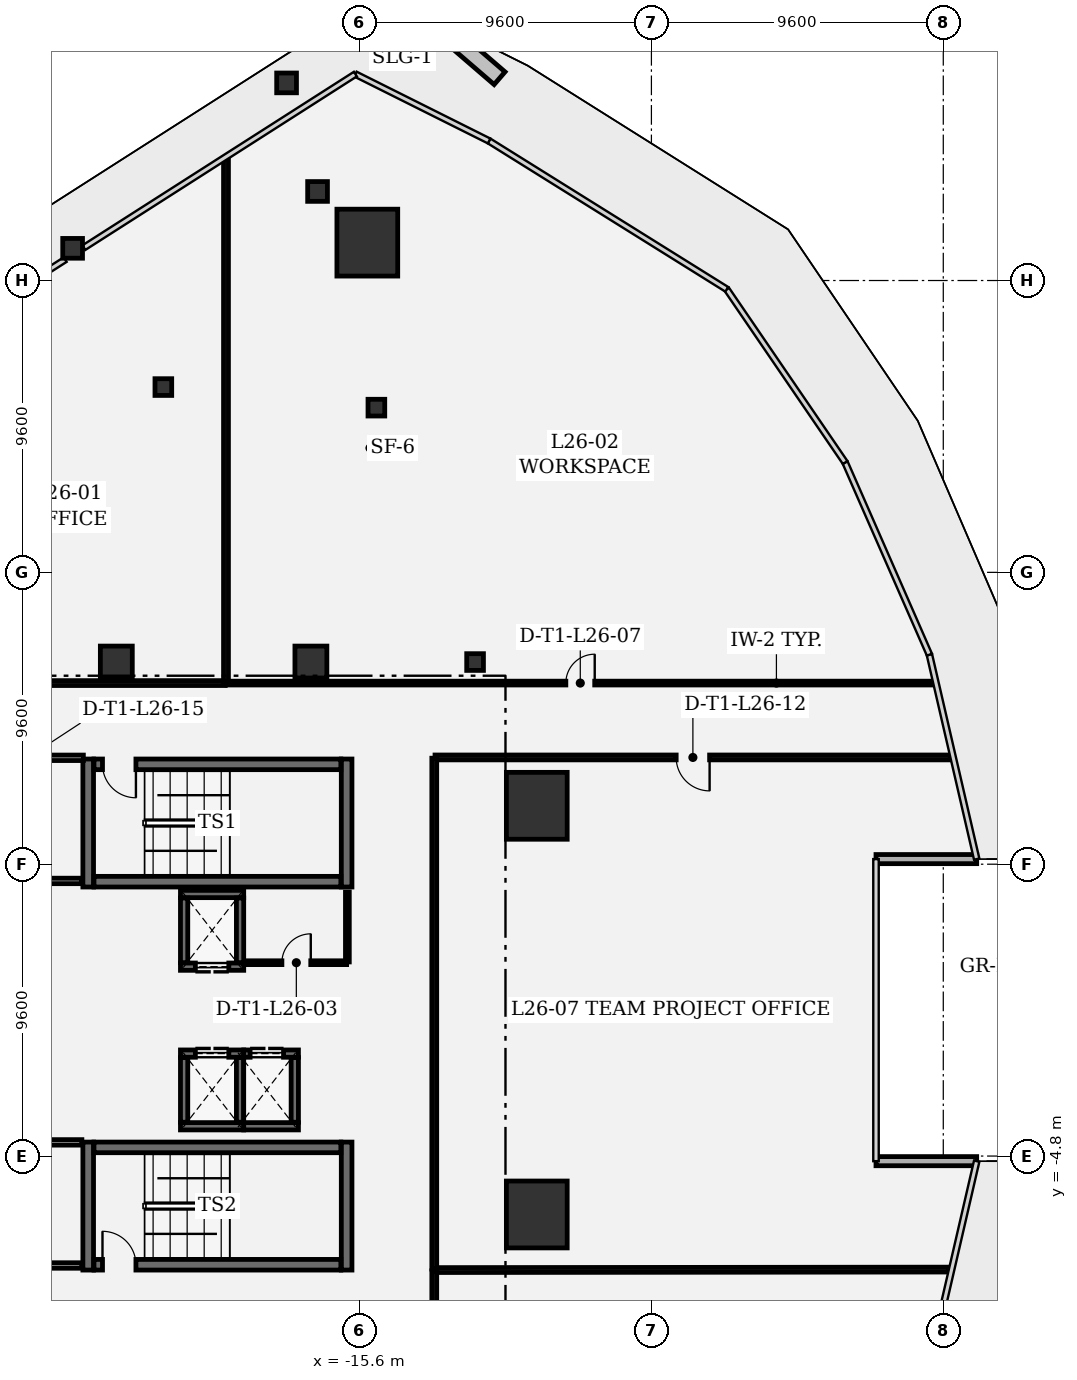
"""IFC4 building model, lengths in metres.
Left out: names, types, materials, properties, quantities, classifications, styles, units other than length and angle.
Written with IfcOpenShell. Run it as: python <this file> out.ifc"""

import sys

from ifc_helpers import new_model, si_unit, direction, frame, frame_2d, origin, origin_2d, place, context, subcontext, project, spatial, rectangle, extrude, element, fill, save


model = new_model("IFC4")
c1 = context("Model", 3, precision=1e-05, world=origin(), true_north=direction((0.0, 1.0)))
c2 = subcontext(c1, "Body", "Model", "MODEL_VIEW")
j1 = project(units=[si_unit("LENGTHUNIT", "METRE"), si_unit("PLANEANGLEUNIT", "RADIAN")], contexts=[c1])
p1 = place(None, origin())
s1 = spatial("IfcSite", under=j1, at=p1, CompositionType="ELEMENT")
p2 = place(p1, origin())
s2 = spatial("IfcBuilding", under=s1, at=p2, CompositionType="ELEMENT")
p3 = place(p2, frame((0.0, 0.0, 117.9)))
s3 = spatial("IfcBuildingStorey", under=s2, at=p3, CompositionType="ELEMENT", Elevation=117.9)
for number, where, z_axis, x_axis in (
    (1, (-9.77, -6.721, 0.0), (0.0, 0.0, 1.0), (1.0, 0.0, 0.0)),
    (2, (-9.77, 6.721, 0.0), (0.0, 0.0, 1.0), (1.0, 0.0, 0.0)),
    (3, (-15.344, 25.246, 0.0), (0.0, 0.0, 1.0), (1.0, 0.0, 0.0)),
):
    element("IfcColumn", number, at=place(p3, frame(where, z_axis=z_axis, x_axis=x_axis)), inside=s3, PredefinedType="COLUMN", context=c2, shape_type="SweptSolid", body=[
        extrude(rectangle(XDim=2.0, YDim=2.2, at=origin_2d()), origin(), (0.0, 0.0, 1.0), 4.05),
    ])
for number, where, z_axis, x_axis in (
    (4, (-23.6, 11.45, 0.0), (0.0, 0.0, 1.0), (1.0, 0.0, 0.0)),
    (5, (-17.2, 11.45, 0.0), (0.0, 0.0, 1.0), (1.0, 0.0, 0.0)),
):
    element("IfcColumn", number, at=place(p3, frame(where, z_axis=z_axis, x_axis=x_axis)), inside=s3, PredefinedType="COLUMN", context=c2, shape_type="SweptSolid", body=[
        extrude(rectangle(XDim=1.05, YDim=1.05, at=origin_2d()), origin(), (0.0, 0.0, 1.0), 4.05),
    ])
for number, where, z_axis, x_axis in (
    (6, (-18.0, 30.5, 0.0), (0.0, 0.0, 1.0), (1.0, 0.0, 0.0)),
    (7, (-25.038, 25.059, 0.0), (0.0, 0.0, 1.0), (1.0, 0.0, 0.0)),
    (8, (-16.981, 26.929, 0.0), (0.0, 0.0, 1.0), (1.0, 0.0, 0.0)),
):
    element("IfcColumn", number, at=place(p3, frame(where, z_axis=z_axis, x_axis=x_axis)), inside=s3, PredefinedType="COLUMN", context=c2, shape_type="SweptSolid", body=[
        extrude(rectangle(XDim=0.65, YDim=0.65, at=origin_2d()), origin(), (0.0, 0.0, 1.0), 4.05),
    ])
for number, where, z_axis, x_axis in (
    (9, (-22.053, 20.495, 0.0), (0.0, 0.0, 1.0), (1.0, 0.0, 0.0)),
    (10, (-15.046, 19.818, 0.0), (0.0, 0.0, 1.0), (1.0, 0.0, 0.0)),
    (11, (-11.8, 11.45, 0.0), (0.0, 0.0, 1.0), (1.0, 0.0, 0.0)),
):
    element("IfcColumn", number, at=place(p3, frame(where, z_axis=z_axis, x_axis=x_axis)), inside=s3, PredefinedType="COLUMN", context=c2, shape_type="SweptSolid", body=[
        extrude(rectangle(XDim=0.55, YDim=0.55, at=origin_2d()), origin(), (0.0, 0.0, 1.0), 4.05),
    ])
for number, where, z_axis, x_axis in (
    (12, (4.699, -4.968, 0.0), (0.0, 0.0, 1.0), (-1.0, 0.0, 0.0)),
    (13, (1.387, 4.968, 0.0), (0.0, 0.0, 1.0), (1.0, 0.0, 0.0)),
):
    element("IfcWall", number, at=place(p3, frame(where, z_axis=z_axis, x_axis=x_axis)), inside=s3, PredefinedType="SOLIDWALL", context=c2, shape_type="SweptSolid", body=[
        extrude(rectangle(XDim=3.312, YDim=0.3, at=frame_2d((1.656, 0.0))), origin(), (0.0, 0.0, 1.0), 3.77),
    ])
for number, where, z_axis, x_axis in (
    (14, (-24.525, 8.26, 0.0), (0.0, 0.0, 1.0), (0.0, -1.0, 0.0)),
    (15, (-16.025, 4.05, 0.0), (0.0, 0.0, 1.0), (0.0, 1.0, 0.0)),
):
    element("IfcWall", number, at=place(p3, frame(where, z_axis=z_axis, x_axis=x_axis)), inside=s3, PredefinedType="SHEAR", context=c2, shape_type="SweptSolid", body=[
        extrude(rectangle(XDim=4.21, YDim=0.35, at=frame_2d((2.105, 0.0))), origin(), (0.0, 0.0, 1.0), 3.77),
    ])
p4 = place(p3, frame((-24.335, 4.225, 0.0), z_axis=(0.0, 0.0, 1.0), x_axis=(1.0, 0.0, 0.0)))
e16 = element("IfcWall", 16, at=p4, inside=s3, PredefinedType="SHEAR", context=c2, shape_type="SweptSolid", body=[
    extrude(rectangle(XDim=8.12, YDim=0.35, at=frame_2d((4.06, 0.0))), origin(), (0.0, 0.0, 1.0), 3.77),
])
p5 = place(p3, frame((-16.215, 8.085, 0.0), z_axis=(0.0, 0.0, 1.0), x_axis=(-1.0, 0.0, 0.0)))
e17 = element("IfcWall", 17, at=p5, inside=s3, PredefinedType="SHEAR", context=c2, shape_type="SweptSolid", body=[
    extrude(rectangle(XDim=8.12, YDim=0.35, at=frame_2d((4.06, 0.0))), origin(), (0.0, 0.0, 1.0), 3.77),
])
p6 = place(p5, frame((6.74, 0.0, 0.0)))
e18 = element("IfcOpeningElement", 18, at=p6, cuts=e17, PredefinedType="OPENING", context=c2, shape_type="SweptSolid", body=[
    extrude(rectangle(XDim=1.1, YDim=2.2, at=frame_2d((0.55, 1.1))), frame((0.0, 0.185, 0.0), z_axis=(0.0, -1.0, 0.0), x_axis=(1.0, 0.0, 0.0)), (0.0, 0.0, 1.0), 0.37),
])
for number, where, z_axis, x_axis in (
    (19, (-24.525, -4.34, 0.0), (0.0, 0.0, 1.0), (0.0, -1.0, 0.0)),
    (20, (-16.025, -8.55, 0.0), (0.0, 0.0, 1.0), (0.0, 1.0, 0.0)),
):
    element("IfcWall", number, at=place(p3, frame(where, z_axis=z_axis, x_axis=x_axis)), inside=s3, PredefinedType="SHEAR", context=c2, shape_type="SweptSolid", body=[
        extrude(rectangle(XDim=4.21, YDim=0.35, at=frame_2d((2.105, 0.0))), origin(), (0.0, 0.0, 1.0), 3.77),
    ])
p7 = place(p3, frame((-24.335, -8.375, 0.0), z_axis=(0.0, 0.0, 1.0), x_axis=(1.0, 0.0, 0.0)))
e21 = element("IfcWall", 21, at=p7, inside=s3, PredefinedType="SHEAR", context=c2, shape_type="SweptSolid", body=[
    extrude(rectangle(XDim=8.12, YDim=0.35, at=frame_2d((4.06, 0.0))), origin(), (0.0, 0.0, 1.0), 3.77),
])
p8 = place(p7, frame((0.28, 0.0, 0.0)))
e22 = element("IfcOpeningElement", 22, at=p8, cuts=e21, PredefinedType="OPENING", context=c2, shape_type="SweptSolid", body=[
    extrude(rectangle(XDim=1.1, YDim=2.2, at=frame_2d((0.55, 1.1))), frame((0.0, 0.185, 0.0), z_axis=(0.0, -1.0, 0.0), x_axis=(1.0, 0.0, 0.0)), (0.0, 0.0, 1.0), 0.37),
])
p9 = place(p3, frame((-16.215, -4.515, 0.0), z_axis=(0.0, 0.0, 1.0), x_axis=(-1.0, 0.0, 0.0)))
e23 = element("IfcWall", 23, at=p9, inside=s3, PredefinedType="SHEAR", context=c2, shape_type="SweptSolid", body=[
    extrude(rectangle(XDim=8.12, YDim=0.35, at=frame_2d((4.06, 0.0))), origin(), (0.0, 0.0, 1.0), 3.77),
])
p10 = place(p3, frame((-19.41, 1.43, 0.0), z_axis=(0.0, 0.0, 1.0), x_axis=(-1.0, 0.0, 0.0)))
e24 = element("IfcWall", 24, at=p10, inside=s3, PredefinedType="SHEAR", context=c2, shape_type="SweptSolid", body=[
    extrude(rectangle(XDim=2.08, YDim=0.24, at=frame_2d((1.04, 0.0))), origin(), (0.0, 0.0, 1.0), 3.77),
])
p11 = place(p10, frame((0.49, 0.0, 0.0)))
e25 = element("IfcOpeningElement", 25, at=p11, cuts=e24, PredefinedType="OPENING", context=c2, shape_type="SweptSolid", body=[
    extrude(rectangle(XDim=1.1, YDim=2.2, at=frame_2d((0.55, 1.1))), frame((0.0, 0.13, 0.0), z_axis=(0.0, -1.0, 0.0), x_axis=(1.0, 0.0, 0.0)), (0.0, 0.0, 1.0), 0.26),
])
p12 = place(p3, frame((-21.49, 3.82, 0.0), z_axis=(0.0, 0.0, 1.0), x_axis=(1.0, 0.0, 0.0)))
e26 = element("IfcWall", 26, at=p12, inside=s3, PredefinedType="SHEAR", context=c2, shape_type="SweptSolid", body=[
    extrude(rectangle(XDim=2.08, YDim=0.24, at=frame_2d((1.04, 0.0))), origin(), (0.0, 0.0, 1.0), 3.77),
])
for number, where, z_axis, x_axis in (
    (27, (-21.37, 1.562, 0.0), (0.0, 0.0, 1.0), (0.0, 1.0, 0.0)),
    (28, (-19.53, 3.688, 0.0), (0.0, 0.0, 1.0), (0.0, -1.0, 0.0)),
):
    element("IfcWall", number, at=place(p3, frame(where, z_axis=z_axis, x_axis=x_axis)), inside=s3, PredefinedType="SHEAR", context=c2, shape_type="SweptSolid", body=[
        extrude(rectangle(XDim=2.126, YDim=0.24, at=frame_2d((1.063, 0.0))), origin(), (0.0, 0.0, 1.0), 3.77),
    ])
p13 = place(p3, frame((-19.41, -3.82, 0.0), z_axis=(0.0, 0.0, 1.0), x_axis=(-1.0, 0.0, 0.0)))
e29 = element("IfcWall", 29, at=p13, inside=s3, PredefinedType="SHEAR", context=c2, shape_type="SweptSolid", body=[
    extrude(rectangle(XDim=2.08, YDim=0.24, at=frame_2d((1.04, 0.0))), origin(), (0.0, 0.0, 1.0), 3.77),
])
p14 = place(p3, frame((-21.49, -1.43, 0.0), z_axis=(0.0, 0.0, 1.0), x_axis=(1.0, 0.0, 0.0)))
e30 = element("IfcWall", 30, at=p14, inside=s3, PredefinedType="SHEAR", context=c2, shape_type="SweptSolid", body=[
    extrude(rectangle(XDim=2.08, YDim=0.24, at=frame_2d((1.04, 0.0))), origin(), (0.0, 0.0, 1.0), 3.77),
])
p15 = place(p14, frame((0.49, 0.0, 0.0)))
e31 = element("IfcOpeningElement", 31, at=p15, cuts=e30, PredefinedType="OPENING", context=c2, shape_type="SweptSolid", body=[
    extrude(rectangle(XDim=1.1, YDim=2.2, at=frame_2d((0.55, 1.1))), frame((0.0, 0.13, 0.0), z_axis=(0.0, -1.0, 0.0), x_axis=(1.0, 0.0, 0.0)), (0.0, 0.0, 1.0), 0.26),
])
for number, where, z_axis, x_axis in (
    (32, (-21.37, -3.688, 0.0), (0.0, 0.0, 1.0), (0.0, 1.0, 0.0)),
    (33, (-19.53, -1.562, 0.0), (0.0, 0.0, 1.0), (0.0, -1.0, 0.0)),
):
    element("IfcWall", number, at=place(p3, frame(where, z_axis=z_axis, x_axis=x_axis)), inside=s3, PredefinedType="SHEAR", context=c2, shape_type="SweptSolid", body=[
        extrude(rectangle(XDim=2.126, YDim=0.24, at=frame_2d((1.063, 0.0))), origin(), (0.0, 0.0, 1.0), 3.77),
    ])
p16 = place(p3, frame((-17.61, -3.82, 0.0), z_axis=(0.0, 0.0, 1.0), x_axis=(-1.0, 0.0, 0.0)))
e34 = element("IfcWall", 34, at=p16, inside=s3, PredefinedType="SHEAR", context=c2, shape_type="SweptSolid", body=[
    extrude(rectangle(XDim=1.8, YDim=0.24, at=frame_2d((0.9, 0.0))), origin(), (0.0, 0.0, 1.0), 3.77),
])
p17 = place(p3, frame((-19.41, -1.43, 0.0), z_axis=(0.0, 0.0, 1.0), x_axis=(1.0, 0.0, 0.0)))
e35 = element("IfcWall", 35, at=p17, inside=s3, PredefinedType="SHEAR", context=c2, shape_type="SweptSolid", body=[
    extrude(rectangle(XDim=1.8, YDim=0.24, at=frame_2d((0.9, 0.0))), origin(), (0.0, 0.0, 1.0), 3.77),
])
p18 = place(p17, frame((0.21, 0.0, 0.0)))
e36 = element("IfcOpeningElement", 36, at=p18, cuts=e35, PredefinedType="OPENING", context=c2, shape_type="SweptSolid", body=[
    extrude(rectangle(XDim=1.1, YDim=2.2, at=frame_2d((0.55, 1.1))), frame((0.0, 0.13, 0.0), z_axis=(0.0, -1.0, 0.0), x_axis=(1.0, 0.0, 0.0)), (0.0, 0.0, 1.0), 0.26),
])
p19 = place(p3, frame((-17.73, -1.562, 0.0), z_axis=(0.0, 0.0, 1.0), x_axis=(0.0, -1.0, 0.0)))
e37 = element("IfcWall", 37, at=p19, inside=s3, PredefinedType="SHEAR", context=c2, shape_type="SweptSolid", body=[
    extrude(rectangle(XDim=2.126, YDim=0.24, at=frame_2d((1.063, 0.0))), origin(), (0.0, 0.0, 1.0), 3.77),
])
p20 = place(p3, frame((-28.355, 4.25, 0.0), z_axis=(0.0, 0.0, 1.0), x_axis=(1.0, 0.0, 0.0)))
e38 = element("IfcWall", 38, at=p20, inside=s3, PredefinedType="PARTITIONING", context=c2, shape_type="SweptSolid", body=[
    extrude(rectangle(XDim=3.622, YDim=0.18, at=frame_2d((1.811, 0.0))), origin(), (0.0, 0.0, 1.0), 3.77),
])
p21 = place(p3, frame((-24.684, 8.3, 0.0), z_axis=(0.0, 0.0, 1.0), x_axis=(-1.0, 0.0, 0.0)))
e39 = element("IfcWall", 39, at=p21, inside=s3, PredefinedType="PARTITIONING", context=c2, shape_type="SweptSolid", body=[
    extrude(rectangle(XDim=3.671, YDim=0.18, at=frame_2d((1.835, 0.0))), origin(), (0.0, 0.0, 1.0), 3.77),
])
p22 = place(p21, frame((1.335, 0.0, 0.0)))
e40 = element("IfcOpeningElement", 40, at=p22, cuts=e39, PredefinedType="OPENING", context=c2, shape_type="SweptSolid", body=[
    extrude(rectangle(XDim=1.0, YDim=2.15, at=frame_2d((0.5, 1.075))), frame((0.0, 0.1, 0.0), z_axis=(0.0, -1.0, 0.0), x_axis=(1.0, 0.0, 0.0)), (0.0, 0.0, 1.0), 0.2),
])
p23 = place(p3, frame((-28.355, -8.4, 0.0), z_axis=(0.0, 0.0, 1.0), x_axis=(1.0, 0.0, 0.0)))
e41 = element("IfcWall", 41, at=p23, inside=s3, PredefinedType="PARTITIONING", context=c2, shape_type="SweptSolid", body=[
    extrude(rectangle(XDim=3.622, YDim=0.18, at=frame_2d((1.811, 0.0))), origin(), (0.0, 0.0, 1.0), 3.77),
])
p24 = place(p23, frame((1.311, 0.0, 0.0)))
e42 = element("IfcOpeningElement", 42, at=p24, cuts=e41, PredefinedType="OPENING", context=c2, shape_type="SweptSolid", body=[
    extrude(rectangle(XDim=1.0, YDim=2.15, at=frame_2d((0.5, 1.075))), frame((0.0, 0.1, 0.0), z_axis=(0.0, -1.0, 0.0), x_axis=(1.0, 0.0, 0.0)), (0.0, 0.0, 1.0), 0.2),
])
p25 = place(p3, frame((-24.733, -4.35, 0.0), z_axis=(0.0, 0.0, 1.0), x_axis=(-1.0, 0.0, 0.0)))
e43 = element("IfcWall", 43, at=p25, inside=s3, PredefinedType="PARTITIONING", context=c2, shape_type="SweptSolid", body=[
    extrude(rectangle(XDim=3.622, YDim=0.18, at=frame_2d((1.811, 0.0))), origin(), (0.0, 0.0, 1.0), 3.77),
])
p26 = place(p3, frame((-19.334, 1.56, 0.0), z_axis=(0.0, 0.0, 1.0), x_axis=(1.0, 0.0, 0.0)))
e44 = element("IfcWall", 44, at=p26, inside=s3, PredefinedType="PARTITIONING", context=c2, shape_type="SweptSolid", body=[
    extrude(rectangle(XDim=3.309, YDim=0.125, at=frame_2d((1.654, 0.0))), origin(), (0.0, 0.0, 1.0), 3.77),
])
p27 = place(p26, frame((1.179, 0.0, 0.0)))
e45 = element("IfcOpeningElement", 45, at=p27, cuts=e44, PredefinedType="OPENING", context=c2, shape_type="SweptSolid", body=[
    extrude(rectangle(XDim=0.95, YDim=2.15, at=frame_2d((0.475, 1.075))), frame((0.0, 0.073, 0.0), z_axis=(0.0, -1.0, 0.0), x_axis=(1.0, 0.0, 0.0)), (0.0, 0.0, 1.0), 0.145),
])
p28 = place(p3, frame((-16.0, 1.585, 0.0), z_axis=(0.0, 0.0, 1.0), x_axis=(0.0, 1.0, 0.0)))
e46 = element("IfcWall", 46, at=p28, inside=s3, PredefinedType="PARTITIONING", context=c2, shape_type="SweptSolid", body=[
    extrude(rectangle(XDim=2.302, YDim=0.125, at=frame_2d((1.151, 0.0))), origin(), (0.0, 0.0, 1.0), 3.77),
])
p29 = place(p3, frame((-37.833, 10.758, 0.0), z_axis=(0.0, 0.0, 1.0), x_axis=(1.0, 0.0, 0.0)))
e47 = element("IfcWall", 47, at=p29, inside=s3, PredefinedType="PARTITIONING", context=c2, shape_type="SweptSolid", body=[
    extrude(rectangle(XDim=17.815, YDim=0.16, at=frame_2d((8.908, 0.0))), origin(), (0.0, 0.0, 1.0), 3.334),
])
p30 = place(p29, frame((8.358, 0.0, 0.0)))
e48 = element("IfcOpeningElement", 48, at=p30, cuts=e47, PredefinedType="OPENING", context=c2, shape_type="SweptSolid", body=[
    extrude(rectangle(XDim=1.1, YDim=2.15, at=frame_2d((0.55, 1.075))), frame((0.0, 0.09, 0.0), z_axis=(0.0, -1.0, 0.0), x_axis=(1.0, 0.0, 0.0)), (0.0, 0.0, 1.0), 0.18),
])
p31 = place(p3, frame((-19.993, 10.783, 0.0), z_axis=(0.0, 0.0, 1.0), x_axis=(0.0, 1.0, 0.0)))
e49 = element("IfcWall", 49, at=p31, inside=s3, PredefinedType="PARTITIONING", context=c2, shape_type="SweptSolid", body=[
    extrude(rectangle(XDim=17.206, YDim=0.16, at=frame_2d((8.603, 0.0))), origin(), (0.0, 0.0, 1.0), 2.885),
])
p32 = place(p3, frame((-19.96, 10.758, 0.0), z_axis=(0.0, 0.0, 1.0), x_axis=(1.0, 0.0, 0.0)))
e50 = element("IfcWall", 50, at=p32, inside=s3, PredefinedType="PARTITIONING", context=c2, shape_type="SweptSolid", body=[
    extrude(rectangle(XDim=23.24, YDim=0.125, at=frame_2d((11.62, 0.0))), origin(), (0.0, 0.0, 1.0), 2.885),
])
p33 = place(p32, frame((11.145, 0.0, 0.0)))
e51 = element("IfcOpeningElement", 51, at=p33, cuts=e50, PredefinedType="OPENING", context=c2, shape_type="SweptSolid", body=[
    extrude(rectangle(XDim=0.95, YDim=2.15, at=frame_2d((0.475, 1.075))), frame((0.0, 0.073, 0.0), z_axis=(0.0, -1.0, 0.0), x_axis=(1.0, 0.0, 0.0)), (0.0, 0.0, 1.0), 0.145),
])
p34 = place(p3, frame((3.794, -8.534, 0.0), z_axis=(0.0, 0.0, 1.0), x_axis=(-0.999999573173, -0.000923933833, 0.0)))
e52 = element("IfcWall", 52, at=p34, inside=s3, PredefinedType="PARTITIONING", context=c2, shape_type="SweptSolid", body=[
    extrude(rectangle(XDim=16.911, YDim=0.16, at=frame_2d((8.456, 0.0))), origin(), (0.0, 0.0, 1.0), 2.885),
])
p35 = place(p3, frame((-13.142, -8.575, 0.0), z_axis=(0.0, 0.0, 1.0), x_axis=(0.0, -1.0, 0.0)))
e53 = element("IfcWall", 53, at=p35, inside=s3, PredefinedType="PARTITIONING", context=c2, shape_type="SweptSolid", body=[
    extrude(rectangle(XDim=2.358, YDim=0.16, at=frame_2d((1.179, 0.0))), origin(), (0.0, 0.0, 1.0), 3.77),
])
p36 = place(p3, frame((3.846, 8.312, 0.0), z_axis=(0.0, 0.0, 1.0), x_axis=(-1.0, 0.0, 0.0)))
e54 = element("IfcWall", 54, at=p36, inside=s3, PredefinedType="PARTITIONING", context=c2, shape_type="SweptSolid", body=[
    extrude(rectangle(XDim=16.963, YDim=0.16, at=frame_2d((8.481, 0.0))), origin(), (0.0, 0.0, 1.0), 2.885),
])
p37 = place(p36, frame((7.931, 0.0, 0.0)))
e55 = element("IfcOpeningElement", 55, at=p37, cuts=e54, PredefinedType="OPENING", context=c2, shape_type="SweptSolid", body=[
    extrude(rectangle(XDim=1.1, YDim=2.15, at=frame_2d((0.55, 1.075))), frame((0.0, 0.09, 0.0), z_axis=(0.0, -1.0, 0.0), x_axis=(1.0, 0.0, 0.0)), (0.0, 0.0, 1.0), 0.18),
])
p38 = place(p3, frame((-13.142, 8.287, 0.0), z_axis=(0.0, 0.0, 1.0), x_axis=(0.0, -1.0, 0.0)))
e56 = element("IfcWall", 56, at=p38, inside=s3, PredefinedType="PARTITIONING", context=c2, shape_type="SweptSolid", body=[
    extrude(rectangle(XDim=16.804, YDim=0.16, at=frame_2d((8.402, 0.0))), origin(), (0.0, 0.0, 1.0), 3.77),
])
p39 = place(p6, origin())
e57 = element("IfcDoor", 57, at=p39, inside=s3, OperationType="SINGLE_SWING_LEFT", PredefinedType="DOOR", context=c2, shape_type="SweptSolid", body=[
    extrude(rectangle(XDim=1.1, YDim=2.2, at=frame_2d((0.55, 1.1))), frame((0.0, 0.025, 0.0), z_axis=(0.0, -1.0, 0.0), x_axis=(1.0, 0.0, 0.0)), (0.0, 0.0, 1.0), 0.05),
])
fill(e18, e57)
p40 = place(p8, origin())
e58 = element("IfcDoor", 58, at=p40, inside=s3, OperationType="SINGLE_SWING_LEFT", PredefinedType="DOOR", context=c2, shape_type="SweptSolid", body=[
    extrude(rectangle(XDim=1.1, YDim=2.2, at=frame_2d((0.55, 1.1))), frame((0.0, 0.025, 0.0), z_axis=(0.0, -1.0, 0.0), x_axis=(1.0, 0.0, 0.0)), (0.0, 0.0, 1.0), 0.05),
])
fill(e22, e58)
p41 = place(p11, origin())
e59 = element("IfcDoor", 59, at=p41, inside=s3, OperationType="DOUBLE_DOOR_SLIDING", PredefinedType="DOOR", context=c2, shape_type="SweptSolid", body=[
    extrude(rectangle(XDim=1.1, YDim=2.2, at=frame_2d((0.55, 1.1))), frame((0.0, 0.025, 0.0), z_axis=(0.0, -1.0, 0.0), x_axis=(1.0, 0.0, 0.0)), (0.0, 0.0, 1.0), 0.05),
])
fill(e25, e59)
p42 = place(p15, origin())
e60 = element("IfcDoor", 60, at=p42, inside=s3, OperationType="DOUBLE_DOOR_SLIDING", PredefinedType="DOOR", context=c2, shape_type="SweptSolid", body=[
    extrude(rectangle(XDim=1.1, YDim=2.2, at=frame_2d((0.55, 1.1))), frame((0.0, 0.025, 0.0), z_axis=(0.0, -1.0, 0.0), x_axis=(1.0, 0.0, 0.0)), (0.0, 0.0, 1.0), 0.05),
])
fill(e31, e60)
p43 = place(p18, origin())
e61 = element("IfcDoor", 61, at=p43, inside=s3, OperationType="DOUBLE_DOOR_SLIDING", PredefinedType="DOOR", context=c2, shape_type="SweptSolid", body=[
    extrude(rectangle(XDim=1.1, YDim=2.2, at=frame_2d((0.55, 1.1))), frame((0.0, 0.025, 0.0), z_axis=(0.0, -1.0, 0.0), x_axis=(1.0, 0.0, 0.0)), (0.0, 0.0, 1.0), 0.05),
])
fill(e36, e61)
p44 = place(p27, origin())
e62 = element("IfcDoor", 62, at=p44, inside=s3, OperationType="SINGLE_SWING_RIGHT", PredefinedType="DOOR", context=c2, shape_type="SweptSolid", body=[
    extrude(rectangle(XDim=0.95, YDim=2.15, at=frame_2d((0.475, 1.075))), frame((0.0, 0.025, 0.0), z_axis=(0.0, -1.0, 0.0), x_axis=(1.0, 0.0, 0.0)), (0.0, 0.0, 1.0), 0.05),
])
fill(e45, e62)
p45 = place(p33, origin())
e63 = element("IfcDoor", 63, at=p45, inside=s3, OperationType="SINGLE_SWING_RIGHT", PredefinedType="DOOR", context=c2, shape_type="SweptSolid", body=[
    extrude(rectangle(XDim=0.95, YDim=2.15, at=frame_2d((0.475, 1.075))), frame((0.0, 0.025, 0.0), z_axis=(0.0, -1.0, 0.0), x_axis=(1.0, 0.0, 0.0)), (0.0, 0.0, 1.0), 0.05),
])
fill(e51, e63)
p46 = place(p37, origin())
e64 = element("IfcDoor", 64, at=p46, inside=s3, OperationType="SINGLE_SWING_LEFT", PredefinedType="DOOR", context=c2, shape_type="SweptSolid", body=[
    extrude(rectangle(XDim=1.1, YDim=2.15, at=frame_2d((0.55, 1.075))), frame((0.0, 0.025, 0.0), z_axis=(0.0, -1.0, 0.0), x_axis=(1.0, 0.0, 0.0)), (0.0, 0.0, 1.0), 0.05),
])
fill(e55, e64)
save(model, sys.argv[1])
